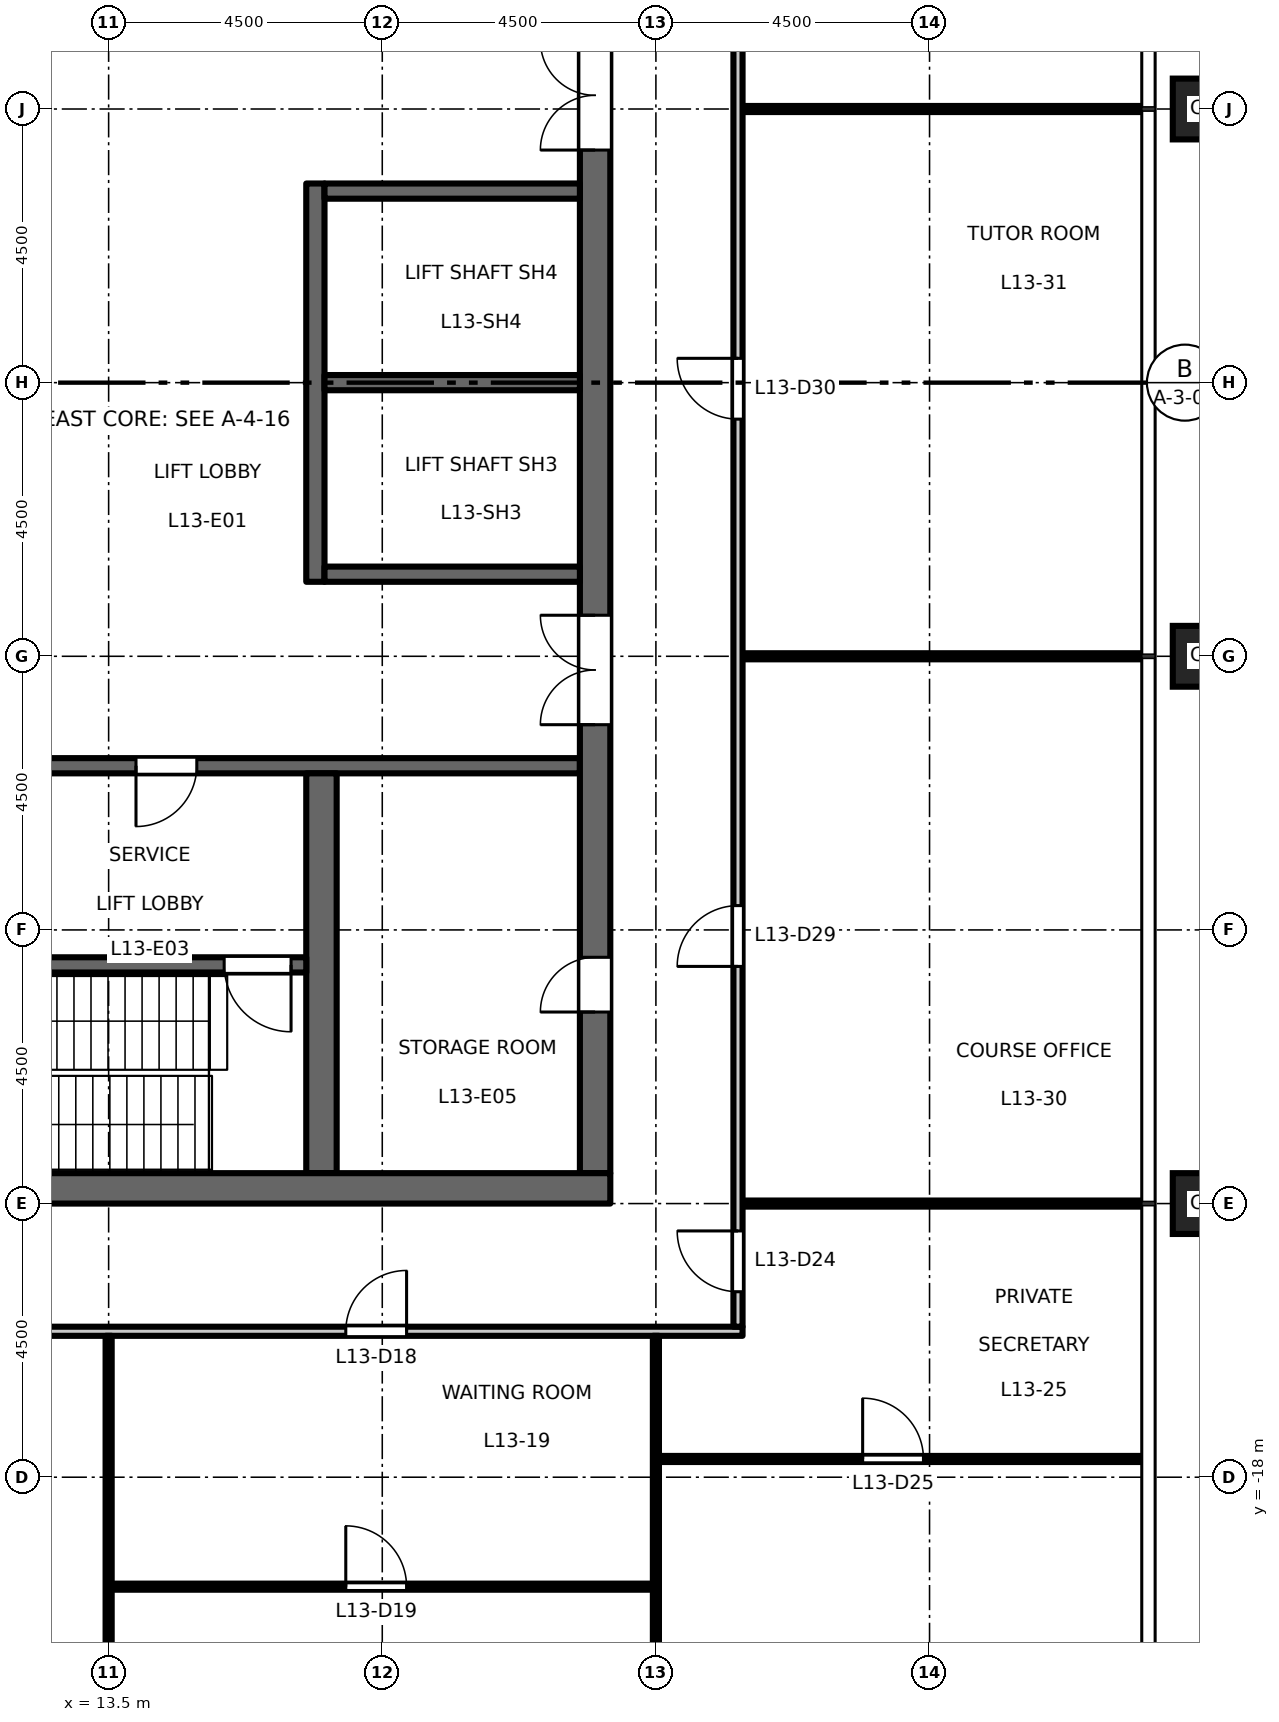
"""IFC4 building model, lengths in metres.
Left out: names, types, materials, properties, quantities, classifications, styles, units other than length and angle.
Written with IfcOpenShell. Run it as: python <this file> out.ifc"""

import sys

from ifc_helpers import new_model, si_unit, direction, frame, frame_2d, origin, origin_2d, place, context, subcontext, project, spatial, rectangle, hollow_rectangle, extrude, element, fill, save


model = new_model("IFC4")
c1 = context("Model", 3, precision=1e-05, world=origin(), true_north=direction((0.0, 1.0)))
c2 = subcontext(c1, "Body", "Model", "MODEL_VIEW")
j1 = project(units=[si_unit("LENGTHUNIT", "METRE"), si_unit("PLANEANGLEUNIT", "RADIAN")], contexts=[c1])
p1 = place(None, origin())
s1 = spatial("IfcSite", under=j1, at=p1, CompositionType="ELEMENT")
p2 = place(p1, origin())
s2 = spatial("IfcBuilding", under=s1, at=p2, CompositionType="ELEMENT")
p3 = place(p2, frame((0.0, 0.0, 62.7)))
s3 = spatial("IfcBuildingStorey", under=s2, at=p3, CompositionType="ELEMENT", Elevation=62.7)
for number, where, z_axis, x_axis in (
    (1, (31.5, -13.5, 0.0), (0.0, 0.0, 1.0), (1.0, 0.0, 0.0)),
    (2, (31.5, -4.5, 0.0), (0.0, 0.0, 1.0), (1.0, 0.0, 0.0)),
    (3, (31.5, 4.5, 0.0), (0.0, 0.0, 1.0), (1.0, 0.0, 0.0)),
):
    element("IfcColumn", number, at=place(p3, frame(where, z_axis=z_axis, x_axis=x_axis)), inside=s3, PredefinedType="COLUMN", context=c2, shape_type="SweptSolid", body=[
        extrude(hollow_rectangle(XDim=1.0, YDim=1.0, WallThickness=0.06, at=origin_2d()), origin(), (0.0, 0.0, 1.0), 4.5),
    ])
p4 = place(p3, frame((12.15, -6.3, 0.0), z_axis=(0.0, 0.0, 1.0), x_axis=(1.0, 0.0, 0.0)))
e4 = element("IfcWall", 4, at=p4, inside=s3, PredefinedType="SHEAR", context=c2, shape_type="SweptSolid", body=[
    extrude(rectangle(XDim=9.1, YDim=0.25, at=frame_2d((4.55, 0.0))), origin(), (0.0, 0.0, 1.0), 4.35),
])
p5 = place(p4, frame((1.8, 0.0, 0.0)))
e5 = element("IfcOpeningElement", 5, at=p5, cuts=e4, PredefinedType="OPENING", context=c2, shape_type="SweptSolid", body=[
    extrude(rectangle(XDim=1.0, YDim=2.1, at=frame_2d((0.5, 1.05))), frame((0.0, 0.135, 0.0), z_axis=(0.0, -1.0, 0.0), x_axis=(1.0, 0.0, 0.0)), (0.0, 0.0, 1.0), 0.27),
])
p6 = place(p3, frame((21.5, -13.0, 0.0), z_axis=(0.0, 0.0, 1.0), x_axis=(0.0, 1.0, 0.0)))
e6 = element("IfcWall", 6, at=p6, inside=s3, PredefinedType="SHEAR", context=c2, shape_type="SweptSolid", body=[
    extrude(rectangle(XDim=26.0, YDim=0.5, at=frame_2d((13.0, 0.0))), origin(), (0.0, 0.0, 1.0), 4.35),
])
p7 = place(p6, frame((16.825, 0.0, 0.0)))
e7 = element("IfcOpeningElement", 7, at=p7, cuts=e6, PredefinedType="OPENING", context=c2, shape_type="SweptSolid", body=[
    extrude(rectangle(XDim=1.8, YDim=2.1, at=frame_2d((0.9, 1.05))), frame((0.0, 0.26, 0.0), z_axis=(0.0, -1.0, 0.0), x_axis=(1.0, 0.0, 0.0)), (0.0, 0.0, 1.0), 0.52),
])
p8 = place(p6, frame((7.375, 0.0, 0.0)))
e8 = element("IfcOpeningElement", 8, at=p8, cuts=e6, PredefinedType="OPENING", context=c2, shape_type="SweptSolid", body=[
    extrude(rectangle(XDim=1.8, YDim=2.1, at=frame_2d((0.9, 1.05))), frame((0.0, 0.26, 0.0), z_axis=(0.0, -1.0, 0.0), x_axis=(1.0, 0.0, 0.0)), (0.0, 0.0, 1.0), 0.52),
])
p9 = place(p6, frame((2.65, 0.0, 0.0)))
e9 = element("IfcOpeningElement", 9, at=p9, cuts=e6, PredefinedType="OPENING", context=c2, shape_type="SweptSolid", body=[
    extrude(rectangle(XDim=0.9, YDim=2.1, at=frame_2d((0.45, 1.05))), frame((0.0, 0.26, 0.0), z_axis=(0.0, -1.0, 0.0), x_axis=(1.0, 0.0, 0.0)), (0.0, 0.0, 1.0), 0.52),
])
p10 = place(p3, frame((16.9, -3.275, 0.0), z_axis=(0.0, 0.0, 1.0), x_axis=(0.0, 1.0, 0.0)))
e10 = element("IfcWall", 10, at=p10, inside=s3, PredefinedType="SHEAR", context=c2, shape_type="SweptSolid", body=[
    extrude(rectangle(XDim=6.55, YDim=0.3, at=frame_2d((3.275, 0.0))), origin(), (0.0, 0.0, 1.0), 4.35),
])
for number, where, z_axis, x_axis in (
    (11, (17.05, 0.0, 0.0), (0.0, 0.0, 1.0), (1.0, 0.0, 0.0)),
    (12, (17.05, 3.15, 0.0), (0.0, 0.0, 1.0), (1.0, 0.0, 0.0)),
    (13, (17.05, -3.15, 0.0), (0.0, 0.0, 1.0), (1.0, 0.0, 0.0)),
):
    element("IfcWall", number, at=place(p3, frame(where, z_axis=z_axis, x_axis=x_axis)), inside=s3, PredefinedType="SHEAR", context=c2, shape_type="SweptSolid", body=[
        extrude(rectangle(XDim=4.2, YDim=0.25, at=frame_2d((2.1, 0.0))), origin(), (0.0, 0.0, 1.0), 4.35),
    ])
p11 = place(p3, frame((17.0, -13.0, 0.0), z_axis=(0.0, 0.0, 1.0), x_axis=(0.0, 1.0, 0.0)))
e14 = element("IfcWall", 14, at=p11, inside=s3, PredefinedType="SHEAR", context=c2, shape_type="SweptSolid", body=[
    extrude(rectangle(XDim=6.575, YDim=0.5, at=frame_2d((3.288, 0.0))), origin(), (0.0, 0.0, 1.0), 4.35),
])
p12 = place(p3, frame((8.75, -9.575, 0.0), z_axis=(0.0, 0.0, 1.0), x_axis=(1.0, 0.0, 0.0)))
e15 = element("IfcWall", 15, at=p12, inside=s3, PredefinedType="SHEAR", context=c2, shape_type="SweptSolid", body=[
    extrude(rectangle(XDim=8.0, YDim=0.25, at=frame_2d((4.0, 0.0))), origin(), (0.0, 0.0, 1.0), 4.35),
])
p13 = place(p12, frame((6.65, 0.0, 0.0)))
e16 = element("IfcOpeningElement", 16, at=p13, cuts=e15, PredefinedType="OPENING", context=c2, shape_type="SweptSolid", body=[
    extrude(rectangle(XDim=1.1, YDim=2.1, at=frame_2d((0.55, 1.05))), frame((0.0, 0.135, 0.0), z_axis=(0.0, -1.0, 0.0), x_axis=(1.0, 0.0, 0.0)), (0.0, 0.0, 1.0), 0.27),
])
p14 = place(p3, frame((8.25, -13.25, 0.0), z_axis=(0.0, 0.0, 1.0), x_axis=(1.0, 0.0, 0.0)))
e17 = element("IfcWall", 17, at=p14, inside=s3, PredefinedType="SHEAR", context=c2, shape_type="SweptSolid", body=[
    extrude(rectangle(XDim=13.5, YDim=0.5, at=frame_2d((6.75, 0.0))), origin(), (0.0, 0.0, 1.0), 4.35),
])
p15 = place(p3, frame((13.55, -19.8, 0.0), z_axis=(0.0, 0.0, 1.0), x_axis=(1.0, 0.0, 0.0)))
e18 = element("IfcWall", 18, at=p15, inside=s3, PredefinedType="PARTITIONING", context=c2, shape_type="SweptSolid", body=[
    extrude(rectangle(XDim=8.9, YDim=0.1, at=frame_2d((4.45, 0.0))), origin(), (0.0, 0.0, 1.0), 4.35),
])
p16 = place(p15, frame((3.85, 0.0, 0.0)))
e19 = element("IfcOpeningElement", 19, at=p16, cuts=e18, PredefinedType="OPENING", context=c2, shape_type="SweptSolid", body=[
    extrude(rectangle(XDim=1.0, YDim=2.1, at=frame_2d((0.5, 1.05))), frame((0.0, 0.06, 0.0), z_axis=(0.0, -1.0, 0.0), x_axis=(1.0, 0.0, 0.0)), (0.0, 0.0, 1.0), 0.12),
])
p17 = place(p3, frame((22.55, -17.7, 0.0), z_axis=(0.0, 0.0, 1.0), x_axis=(1.0, 0.0, 0.0)))
e20 = element("IfcWall", 20, at=p17, inside=s3, PredefinedType="PARTITIONING", context=c2, shape_type="SweptSolid", body=[
    extrude(rectangle(XDim=7.96, YDim=0.1, at=frame_2d((3.98, 0.0))), origin(), (0.0, 0.0, 1.0), 4.35),
])
p18 = place(p17, frame((3.35, 0.0, 0.0)))
e21 = element("IfcOpeningElement", 21, at=p18, cuts=e20, PredefinedType="OPENING", context=c2, shape_type="SweptSolid", body=[
    extrude(rectangle(XDim=1.0, YDim=2.1, at=frame_2d((0.5, 1.05))), frame((0.0, 0.06, 0.0), z_axis=(0.0, -1.0, 0.0), x_axis=(1.0, 0.0, 0.0)), (0.0, 0.0, 1.0), 0.12),
])
p19 = place(p3, frame((-23.925, -15.6, 0.0), z_axis=(0.0, 0.0, 1.0), x_axis=(1.0, 0.0, 0.0)))
e22 = element("IfcWall", 22, at=p19, inside=s3, PredefinedType="PARTITIONING", context=c2, shape_type="SweptSolid", body=[
    extrude(rectangle(XDim=47.85, YDim=0.15, at=frame_2d((23.925, 0.0))), origin(), (0.0, 0.0, 1.0), 4.35),
])
p20 = place(p19, frame((5.325, 0.0, 0.0)))
e23 = element("IfcOpeningElement", 23, at=p20, cuts=e22, PredefinedType="OPENING", context=c2, shape_type="SweptSolid", body=[
    extrude(rectangle(XDim=1.0, YDim=2.1, at=frame_2d((0.5, 1.05))), frame((0.0, 0.085, 0.0), z_axis=(0.0, -1.0, 0.0), x_axis=(1.0, 0.0, 0.0)), (0.0, 0.0, 1.0), 0.17),
])
p21 = place(p19, frame((14.325, 0.0, 0.0)))
e24 = element("IfcOpeningElement", 24, at=p21, cuts=e22, PredefinedType="OPENING", context=c2, shape_type="SweptSolid", body=[
    extrude(rectangle(XDim=1.0, YDim=2.1, at=frame_2d((0.5, 1.05))), frame((0.0, 0.085, 0.0), z_axis=(0.0, -1.0, 0.0), x_axis=(1.0, 0.0, 0.0)), (0.0, 0.0, 1.0), 0.17),
])
p22 = place(p19, frame((23.325, 0.0, 0.0)))
e25 = element("IfcOpeningElement", 25, at=p22, cuts=e22, PredefinedType="OPENING", context=c2, shape_type="SweptSolid", body=[
    extrude(rectangle(XDim=1.0, YDim=2.1, at=frame_2d((0.5, 1.05))), frame((0.0, 0.085, 0.0), z_axis=(0.0, -1.0, 0.0), x_axis=(1.0, 0.0, 0.0)), (0.0, 0.0, 1.0), 0.17),
])
p23 = place(p19, frame((32.325, 0.0, 0.0)))
e26 = element("IfcOpeningElement", 26, at=p23, cuts=e22, PredefinedType="OPENING", context=c2, shape_type="SweptSolid", body=[
    extrude(rectangle(XDim=1.0, YDim=2.1, at=frame_2d((0.5, 1.05))), frame((0.0, 0.085, 0.0), z_axis=(0.0, -1.0, 0.0), x_axis=(1.0, 0.0, 0.0)), (0.0, 0.0, 1.0), 0.17),
])
p24 = place(p19, frame((41.325, 0.0, 0.0)))
e27 = element("IfcOpeningElement", 27, at=p24, cuts=e22, PredefinedType="OPENING", context=c2, shape_type="SweptSolid", body=[
    extrude(rectangle(XDim=1.0, YDim=2.1, at=frame_2d((0.5, 1.05))), frame((0.0, 0.085, 0.0), z_axis=(0.0, -1.0, 0.0), x_axis=(1.0, 0.0, 0.0)), (0.0, 0.0, 1.0), 0.17),
])
p25 = place(p3, frame((23.925, -13.5, 0.0), z_axis=(0.0, 0.0, 1.0), x_axis=(1.0, 0.0, 0.0)))
e28 = element("IfcWall", 28, at=p25, inside=s3, PredefinedType="PARTITIONING", context=c2, shape_type="SweptSolid", body=[
    extrude(rectangle(XDim=6.585, YDim=0.1, at=frame_2d((3.292, 0.0))), origin(), (0.0, 0.0, 1.0), 3.35),
])
for number, where, z_axis, x_axis in (
    (29, (23.925, -4.5, 0.0), (0.0, 0.0, 1.0), (1.0, 0.0, 0.0)),
    (30, (23.925, 4.5, 0.0), (0.0, 0.0, 1.0), (1.0, 0.0, 0.0)),
):
    element("IfcWall", number, at=place(p3, frame(where, z_axis=z_axis, x_axis=x_axis)), inside=s3, PredefinedType="PARTITIONING", context=c2, shape_type="SweptSolid", body=[
        extrude(rectangle(XDim=6.585, YDim=0.1, at=frame_2d((3.292, 0.0))), origin(), (0.0, 0.0, 1.0), 4.35),
    ])
p26 = place(p3, frame((13.5, -30.51, 0.0), z_axis=(0.0, 0.0, 1.0), x_axis=(0.0, 1.0, 0.0)))
e31 = element("IfcWall", 31, at=p26, inside=s3, PredefinedType="PARTITIONING", context=c2, shape_type="SweptSolid", body=[
    extrude(rectangle(XDim=14.835, YDim=0.1, at=frame_2d((7.417, 0.0))), origin(), (0.0, 0.0, 1.0), 3.35),
])
p27 = place(p3, frame((22.5, -30.428, 0.0), z_axis=(0.0, 0.0, 1.0), x_axis=(0.0, 1.0, 0.0)))
e32 = element("IfcWall", 32, at=p27, inside=s3, PredefinedType="PARTITIONING", context=c2, shape_type="SweptSolid", body=[
    extrude(rectangle(XDim=14.753, YDim=0.1, at=frame_2d((7.376, 0.0))), origin(), (0.0, 0.0, 1.0), 3.35),
])
p28 = place(p3, frame((23.85, -15.525, 0.0), z_axis=(0.0, 0.0, 1.0), x_axis=(0.0, 1.0, 0.0)))
e33 = element("IfcWall", 33, at=p28, inside=s3, PredefinedType="PARTITIONING", context=c2, shape_type="SweptSolid", body=[
    extrude(rectangle(XDim=31.05, YDim=0.15, at=frame_2d((15.525, 0.0))), origin(), (0.0, 0.0, 1.0), 4.35),
])
p29 = place(p28, frame((29.675, 0.0, 0.0)))
e34 = element("IfcOpeningElement", 34, at=p29, cuts=e33, PredefinedType="OPENING", context=c2, shape_type="SweptSolid", body=[
    extrude(rectangle(XDim=1.0, YDim=2.1, at=frame_2d((0.5, 1.05))), frame((0.0, 0.085, 0.0), z_axis=(0.0, -1.0, 0.0), x_axis=(1.0, 0.0, 0.0)), (0.0, 0.0, 1.0), 0.17),
])
p30 = place(p28, frame((0.575, 0.0, 0.0)))
e35 = element("IfcOpeningElement", 35, at=p30, cuts=e33, PredefinedType="OPENING", context=c2, shape_type="SweptSolid", body=[
    extrude(rectangle(XDim=1.0, YDim=2.1, at=frame_2d((0.5, 1.05))), frame((0.0, 0.085, 0.0), z_axis=(0.0, -1.0, 0.0), x_axis=(1.0, 0.0, 0.0)), (0.0, 0.0, 1.0), 0.17),
])
p31 = place(p28, frame((5.925, 0.0, 0.0)))
e36 = element("IfcOpeningElement", 36, at=p31, cuts=e33, PredefinedType="OPENING", context=c2, shape_type="SweptSolid", body=[
    extrude(rectangle(XDim=1.0, YDim=2.1, at=frame_2d((0.5, 1.05))), frame((0.0, 0.085, 0.0), z_axis=(0.0, -1.0, 0.0), x_axis=(1.0, 0.0, 0.0)), (0.0, 0.0, 1.0), 0.17),
])
p32 = place(p28, frame((14.925, 0.0, 0.0)))
e37 = element("IfcOpeningElement", 37, at=p32, cuts=e33, PredefinedType="OPENING", context=c2, shape_type="SweptSolid", body=[
    extrude(rectangle(XDim=1.0, YDim=2.1, at=frame_2d((0.5, 1.05))), frame((0.0, 0.085, 0.0), z_axis=(0.0, -1.0, 0.0), x_axis=(1.0, 0.0, 0.0)), (0.0, 0.0, 1.0), 0.17),
])
p33 = place(p28, frame((23.925, 0.0, 0.0)))
e38 = element("IfcOpeningElement", 38, at=p33, cuts=e33, PredefinedType="OPENING", context=c2, shape_type="SweptSolid", body=[
    extrude(rectangle(XDim=1.0, YDim=2.1, at=frame_2d((0.5, 1.05))), frame((0.0, 0.085, 0.0), z_axis=(0.0, -1.0, 0.0), x_axis=(1.0, 0.0, 0.0)), (0.0, 0.0, 1.0), 0.17),
])
p34 = place(p5, origin())
e39 = element("IfcDoor", 39, at=p34, inside=s3, OperationType="SINGLE_SWING_LEFT", PredefinedType="DOOR", context=c2, shape_type="SweptSolid", body=[
    extrude(rectangle(XDim=1.0, YDim=2.1, at=frame_2d((0.5, 1.05))), frame((0.0, 0.025, 0.0), z_axis=(0.0, -1.0, 0.0), x_axis=(1.0, 0.0, 0.0)), (0.0, 0.0, 1.0), 0.05),
])
fill(e5, e39)
p35 = place(p13, origin())
e40 = element("IfcDoor", 40, at=p35, inside=s3, OperationType="SINGLE_SWING_RIGHT", PredefinedType="DOOR", context=c2, shape_type="SweptSolid", body=[
    extrude(rectangle(XDim=1.1, YDim=2.1, at=frame_2d((0.55, 1.05))), frame((0.0, 0.025, 0.0), z_axis=(0.0, -1.0, 0.0), x_axis=(1.0, 0.0, 0.0)), (0.0, 0.0, 1.0), 0.05),
])
fill(e16, e40)
p36 = place(p7, origin())
e41 = element("IfcDoor", 41, at=p36, inside=s3, OperationType="DOUBLE_DOOR_DOUBLE_SWING", PredefinedType="DOOR", context=c2, shape_type="SweptSolid", body=[
    extrude(rectangle(XDim=1.8, YDim=2.1, at=frame_2d((0.9, 1.05))), frame((0.0, 0.025, 0.0), z_axis=(0.0, -1.0, 0.0), x_axis=(1.0, 0.0, 0.0)), (0.0, 0.0, 1.0), 0.05),
])
fill(e7, e41)
p37 = place(p8, origin())
e42 = element("IfcDoor", 42, at=p37, inside=s3, OperationType="DOUBLE_DOOR_DOUBLE_SWING", PredefinedType="DOOR", context=c2, shape_type="SweptSolid", body=[
    extrude(rectangle(XDim=1.8, YDim=2.1, at=frame_2d((0.9, 1.05))), frame((0.0, 0.025, 0.0), z_axis=(0.0, -1.0, 0.0), x_axis=(1.0, 0.0, 0.0)), (0.0, 0.0, 1.0), 0.05),
])
fill(e8, e42)
p38 = place(p9, origin())
e43 = element("IfcDoor", 43, at=p38, inside=s3, OperationType="SINGLE_SWING_RIGHT", PredefinedType="DOOR", context=c2, shape_type="SweptSolid", body=[
    extrude(rectangle(XDim=0.9, YDim=2.1, at=frame_2d((0.45, 1.05))), frame((0.0, 0.025, 0.0), z_axis=(0.0, -1.0, 0.0), x_axis=(1.0, 0.0, 0.0)), (0.0, 0.0, 1.0), 0.05),
])
fill(e9, e43)
p39 = place(p24, origin())
e44 = element("IfcDoor", 44, at=p39, inside=s3, OperationType="SINGLE_SWING_RIGHT", PredefinedType="DOOR", context=c2, shape_type="SweptSolid", body=[
    extrude(rectangle(XDim=1.0, YDim=2.1, at=frame_2d((0.5, 1.05))), frame((0.0, 0.025, 0.0), z_axis=(0.0, -1.0, 0.0), x_axis=(1.0, 0.0, 0.0)), (0.0, 0.0, 1.0), 0.05),
])
fill(e27, e44)
p40 = place(p16, origin())
e45 = element("IfcDoor", 45, at=p40, inside=s3, OperationType="SINGLE_SWING_LEFT", PredefinedType="DOOR", context=c2, shape_type="SweptSolid", body=[
    extrude(rectangle(XDim=1.0, YDim=2.1, at=frame_2d((0.5, 1.05))), frame((0.0, 0.025, 0.0), z_axis=(0.0, -1.0, 0.0), x_axis=(1.0, 0.0, 0.0)), (0.0, 0.0, 1.0), 0.05),
])
fill(e19, e45)
p41 = place(p30, origin())
e46 = element("IfcDoor", 46, at=p41, inside=s3, OperationType="SINGLE_SWING_RIGHT", PredefinedType="DOOR", context=c2, shape_type="SweptSolid", body=[
    extrude(rectangle(XDim=1.0, YDim=2.1, at=frame_2d((0.5, 1.05))), frame((0.0, 0.025, 0.0), z_axis=(0.0, -1.0, 0.0), x_axis=(1.0, 0.0, 0.0)), (0.0, 0.0, 1.0), 0.05),
])
fill(e35, e46)
p42 = place(p18, origin())
e47 = element("IfcDoor", 47, at=p42, inside=s3, OperationType="SINGLE_SWING_LEFT", PredefinedType="DOOR", context=c2, shape_type="SweptSolid", body=[
    extrude(rectangle(XDim=1.0, YDim=2.1, at=frame_2d((0.5, 1.05))), frame((0.0, 0.025, 0.0), z_axis=(0.0, -1.0, 0.0), x_axis=(1.0, 0.0, 0.0)), (0.0, 0.0, 1.0), 0.05),
])
fill(e21, e47)
p43 = place(p31, origin())
e48 = element("IfcDoor", 48, at=p43, inside=s3, OperationType="SINGLE_SWING_LEFT", PredefinedType="DOOR", context=c2, shape_type="SweptSolid", body=[
    extrude(rectangle(XDim=1.0, YDim=2.1, at=frame_2d((0.5, 1.05))), frame((0.0, 0.025, 0.0), z_axis=(0.0, -1.0, 0.0), x_axis=(1.0, 0.0, 0.0)), (0.0, 0.0, 1.0), 0.05),
])
fill(e36, e48)
p44 = place(p32, origin())
e49 = element("IfcDoor", 49, at=p44, inside=s3, OperationType="SINGLE_SWING_RIGHT", PredefinedType="DOOR", context=c2, shape_type="SweptSolid", body=[
    extrude(rectangle(XDim=1.0, YDim=2.1, at=frame_2d((0.5, 1.05))), frame((0.0, 0.025, 0.0), z_axis=(0.0, -1.0, 0.0), x_axis=(1.0, 0.0, 0.0)), (0.0, 0.0, 1.0), 0.05),
])
fill(e37, e49)
save(model, sys.argv[1])
